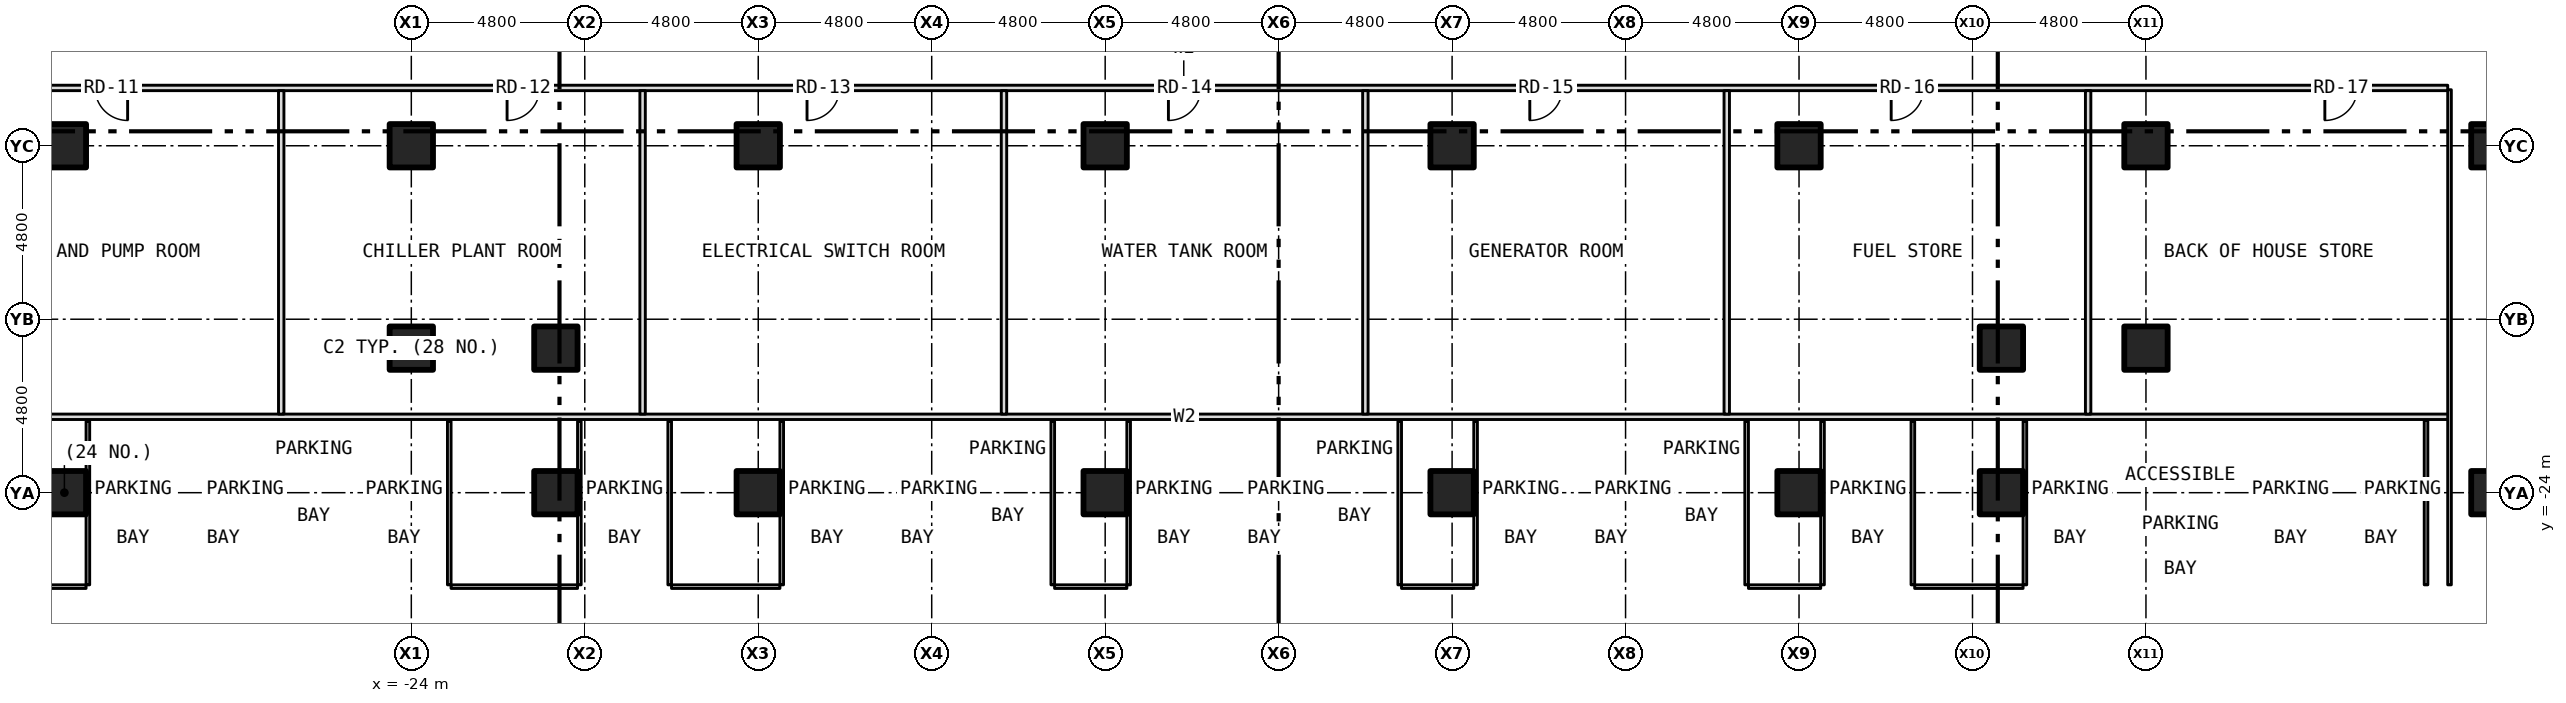
"""IFC4 building model, lengths in metres.
Left out: names, types, materials, properties, quantities, classifications, styles, units other than length and angle.
Written with IfcOpenShell. Run it as: python <this file> out.ifc"""

import sys

from ifc_helpers import new_model, si_unit, direction, frame, frame_2d, origin, origin_2d, place, context, subcontext, project, spatial, rectangle, hollow_rectangle, extrude, element, fill, save


model = new_model("IFC4")
c1 = context("Model", 3, precision=1e-05, world=origin(), true_north=direction((0.0, 1.0)))
c2 = subcontext(c1, "Body", "Model", "MODEL_VIEW")
j1 = project(units=[si_unit("LENGTHUNIT", "METRE"), si_unit("PLANEANGLEUNIT", "RADIAN")], contexts=[c1])
p1 = place(None, origin())
s1 = spatial("IfcSite", under=j1, at=p1, CompositionType="ELEMENT")
p2 = place(p1, origin())
s2 = spatial("IfcBuilding", under=s1, at=p2, CompositionType="ELEMENT")
p3 = place(p2, frame((0.0, 0.0, -10.0)))
s3 = spatial("IfcBuildingStorey", under=s2, at=p3, CompositionType="ELEMENT", Elevation=-10.0)
for number, where, z_axis, x_axis in (
    (1, (-33.6, -24.0, -0.6), (0.0, 0.0, 1.0), (1.0, 0.0, 0.0)),
    (2, (-33.6, -14.4, -0.6), (0.0, 0.0, 1.0), (1.0, 0.0, 0.0)),
    (3, (-20.0, -24.0, -0.6), (0.0, 0.0, 1.0), (1.0, 0.0, 0.0)),
    (4, (-14.4, -24.0, -0.6), (0.0, 0.0, 1.0), (1.0, 0.0, 0.0)),
    (5, (-4.8, -24.0, -0.6), (0.0, 0.0, 1.0), (1.0, 0.0, 0.0)),
    (6, (4.8, -24.0, -0.6), (0.0, 0.0, 1.0), (1.0, 0.0, 0.0)),
    (7, (14.4, -24.0, -0.6), (0.0, 0.0, 1.0), (1.0, 0.0, 0.0)),
    (8, (20.0, -24.0, -0.6), (0.0, 0.0, 1.0), (1.0, 0.0, 0.0)),
    (9, (33.6, -24.0, -0.6), (0.0, 0.0, 1.0), (1.0, 0.0, 0.0)),
    (10, (33.6, -14.4, -0.6), (0.0, 0.0, 1.0), (1.0, 0.0, 0.0)),
    (11, (-24.0, -20.0, -0.6), (0.0, 0.0, 1.0), (1.0, 0.0, 0.0)),
    (12, (-24.0, -14.4, -0.6), (0.0, 0.0, 1.0), (1.0, 0.0, 0.0)),
    (13, (-20.0, -20.0, -0.6), (0.0, 0.0, 1.0), (1.0, 0.0, 0.0)),
    (14, (-14.4, -14.4, -0.6), (0.0, 0.0, 1.0), (1.0, 0.0, 0.0)),
    (15, (-4.8, -14.4, -0.6), (0.0, 0.0, 1.0), (1.0, 0.0, 0.0)),
    (16, (4.8, -14.4, -0.6), (0.0, 0.0, 1.0), (1.0, 0.0, 0.0)),
    (17, (14.4, -14.4, -0.6), (0.0, 0.0, 1.0), (1.0, 0.0, 0.0)),
    (18, (20.0, -20.0, -0.6), (0.0, 0.0, 1.0), (1.0, 0.0, 0.0)),
    (19, (24.0, -20.0, -0.6), (0.0, 0.0, 1.0), (1.0, 0.0, 0.0)),
    (20, (24.0, -14.4, -0.6), (0.0, 0.0, 1.0), (1.0, 0.0, 0.0)),
):
    element("IfcColumn", number, at=place(p3, frame(where, z_axis=z_axis, x_axis=x_axis)), inside=s3, PredefinedType="COLUMN", context=c2, shape_type="SweptSolid", body=[
        extrude(hollow_rectangle(XDim=1.2, YDim=1.2, WallThickness=0.07, at=origin_2d()), origin(), (0.0, 0.0, 1.0), 5.3),
    ])
p4 = place(p3, frame((-35.05, -26.6, 0.0), z_axis=(0.0, 0.0, 1.0), x_axis=(1.0, 0.0, 0.0)))
e21 = element("IfcWall", 21, at=p4, inside=s3, PredefinedType="PARTITIONING", context=c2, shape_type="SweptSolid", body=[
    extrude(rectangle(XDim=2.05, YDim=0.1, at=frame_2d((1.025, 0.0))), origin(), (0.0, 0.0, 1.0), 4.7),
])
p5 = place(p3, frame((-22.9, -26.6, 0.0), z_axis=(0.0, 0.0, 1.0), x_axis=(1.0, 0.0, 0.0)))
e22 = element("IfcWall", 22, at=p5, inside=s3, PredefinedType="PARTITIONING", context=c2, shape_type="SweptSolid", body=[
    extrude(rectangle(XDim=3.5, YDim=0.1, at=frame_2d((1.75, 0.0))), origin(), (0.0, 0.0, 1.0), 4.7),
])
p6 = place(p3, frame((-16.8, -26.6, 0.0), z_axis=(0.0, 0.0, 1.0), x_axis=(1.0, 0.0, 0.0)))
e23 = element("IfcWall", 23, at=p6, inside=s3, PredefinedType="PARTITIONING", context=c2, shape_type="SweptSolid", body=[
    extrude(rectangle(XDim=3.0, YDim=0.1, at=frame_2d((1.5, 0.0))), origin(), (0.0, 0.0, 1.0), 4.7),
])
for number, where, z_axis, x_axis in (
    (24, (-6.2, -26.6, 0.0), (0.0, 0.0, 1.0), (1.0, 0.0, 0.0)),
    (25, (3.4, -26.6, 0.0), (0.0, 0.0, 1.0), (1.0, 0.0, 0.0)),
    (26, (13.0, -26.6, 0.0), (0.0, 0.0, 1.0), (1.0, 0.0, 0.0)),
):
    element("IfcWall", number, at=place(p3, frame(where, z_axis=z_axis, x_axis=x_axis)), inside=s3, PredefinedType="PARTITIONING", context=c2, shape_type="SweptSolid", body=[
        extrude(rectangle(XDim=2.0, YDim=0.1, at=frame_2d((1.0, 0.0))), origin(), (0.0, 0.0, 1.0), 4.7),
    ])
p7 = place(p3, frame((17.6, -26.6, 0.0), z_axis=(0.0, 0.0, 1.0), x_axis=(1.0, 0.0, 0.0)))
e27 = element("IfcWall", 27, at=p7, inside=s3, PredefinedType="PARTITIONING", context=c2, shape_type="SweptSolid", body=[
    extrude(rectangle(XDim=3.0, YDim=0.1, at=frame_2d((1.5, 0.0))), origin(), (0.0, 0.0, 1.0), 4.7),
])
p8 = place(p3, frame((-37.6, -21.9, 0.0), z_axis=(0.0, 0.0, 1.0), x_axis=(1.0, 0.0, 0.0)))
e28 = element("IfcWall", 28, at=p8, inside=s3, PredefinedType="PARTITIONING", context=c2, shape_type="SweptSolid", body=[
    extrude(rectangle(XDim=70.0, YDim=0.15, at=frame_2d((35.0, 0.0))), origin(), (0.0, 0.0, 1.0), 4.7),
])
p9 = place(p3, frame((-37.6, -12.8, 0.0), z_axis=(0.0, 0.0, 1.0), x_axis=(1.0, 0.0, 0.0)))
e29 = element("IfcWall", 29, at=p9, inside=s3, PredefinedType="PARTITIONING", context=c2, shape_type="SweptSolid", body=[
    extrude(rectangle(XDim=69.95, YDim=0.15, at=frame_2d((34.975, 0.0))), origin(), (0.0, 0.0, 1.0), 4.7),
])
p10 = place(p9, frame((4.85, 0.0, 0.0)))
e30 = element("IfcOpeningElement", 30, at=p10, cuts=e29, PredefinedType="OPENING", context=c2, shape_type="SweptSolid", body=[
    extrude(rectangle(XDim=0.9, YDim=2.1, at=frame_2d((0.45, 1.05))), frame((0.0, 0.087, 0.0), z_axis=(0.0, -1.0, 0.0), x_axis=(1.0, 0.0, 0.0)), (0.0, 0.0, 1.0), 0.174),
])
p11 = place(p9, frame((16.25, 0.0, 0.0)))
e31 = element("IfcOpeningElement", 31, at=p11, cuts=e29, PredefinedType="OPENING", context=c2, shape_type="SweptSolid", body=[
    extrude(rectangle(XDim=0.9, YDim=2.1, at=frame_2d((0.45, 1.05))), frame((0.0, 0.087, 0.0), z_axis=(0.0, -1.0, 0.0), x_axis=(1.0, 0.0, 0.0)), (0.0, 0.0, 1.0), 0.174),
])
p12 = place(p9, frame((24.55, 0.0, 0.0)))
e32 = element("IfcOpeningElement", 32, at=p12, cuts=e29, PredefinedType="OPENING", context=c2, shape_type="SweptSolid", body=[
    extrude(rectangle(XDim=0.9, YDim=2.1, at=frame_2d((0.45, 1.05))), frame((0.0, 0.087, 0.0), z_axis=(0.0, -1.0, 0.0), x_axis=(1.0, 0.0, 0.0)), (0.0, 0.0, 1.0), 0.174),
])
p13 = place(p9, frame((34.55, 0.0, 0.0)))
e33 = element("IfcOpeningElement", 33, at=p13, cuts=e29, PredefinedType="OPENING", context=c2, shape_type="SweptSolid", body=[
    extrude(rectangle(XDim=0.9, YDim=2.1, at=frame_2d((0.45, 1.05))), frame((0.0, 0.087, 0.0), z_axis=(0.0, -1.0, 0.0), x_axis=(1.0, 0.0, 0.0)), (0.0, 0.0, 1.0), 0.174),
])
p14 = place(p9, frame((44.55, 0.0, 0.0)))
e34 = element("IfcOpeningElement", 34, at=p14, cuts=e29, PredefinedType="OPENING", context=c2, shape_type="SweptSolid", body=[
    extrude(rectangle(XDim=0.9, YDim=2.1, at=frame_2d((0.45, 1.05))), frame((0.0, 0.087, 0.0), z_axis=(0.0, -1.0, 0.0), x_axis=(1.0, 0.0, 0.0)), (0.0, 0.0, 1.0), 0.174),
])
p15 = place(p9, frame((54.55, 0.0, 0.0)))
e35 = element("IfcOpeningElement", 35, at=p15, cuts=e29, PredefinedType="OPENING", context=c2, shape_type="SweptSolid", body=[
    extrude(rectangle(XDim=0.9, YDim=2.1, at=frame_2d((0.45, 1.05))), frame((0.0, 0.087, 0.0), z_axis=(0.0, -1.0, 0.0), x_axis=(1.0, 0.0, 0.0)), (0.0, 0.0, 1.0), 0.174),
])
p16 = place(p9, frame((66.55, 0.0, 0.0)))
e36 = element("IfcOpeningElement", 36, at=p16, cuts=e29, PredefinedType="OPENING", context=c2, shape_type="SweptSolid", body=[
    extrude(rectangle(XDim=0.9, YDim=2.1, at=frame_2d((0.45, 1.05))), frame((0.0, 0.087, 0.0), z_axis=(0.0, -1.0, 0.0), x_axis=(1.0, 0.0, 0.0)), (0.0, 0.0, 1.0), 0.174),
])
p17 = place(p3, frame((-32.95, -26.55, 0.0), z_axis=(0.0, 0.0, 1.0), x_axis=(0.0, 1.0, 0.0)))
e37 = element("IfcWall", 37, at=p17, inside=s3, PredefinedType="PARTITIONING", context=c2, shape_type="SweptSolid", body=[
    extrude(rectangle(XDim=4.525, YDim=0.1, at=frame_2d((2.263, 0.0))), origin(), (0.0, 0.0, 1.0), 4.7),
])
p18 = place(p3, frame((-27.6, -21.825, 0.0), z_axis=(0.0, 0.0, 1.0), x_axis=(0.0, 1.0, 0.0)))
e38 = element("IfcWall", 38, at=p18, inside=s3, PredefinedType="PARTITIONING", context=c2, shape_type="SweptSolid", body=[
    extrude(rectangle(XDim=8.95, YDim=0.15, at=frame_2d((4.475, 0.0))), origin(), (0.0, 0.0, 1.0), 4.7),
])
p19 = place(p3, frame((-22.95, -26.55, 0.0), z_axis=(0.0, 0.0, 1.0), x_axis=(0.0, 1.0, 0.0)))
e39 = element("IfcWall", 39, at=p19, inside=s3, PredefinedType="PARTITIONING", context=c2, shape_type="SweptSolid", body=[
    extrude(rectangle(XDim=4.525, YDim=0.1, at=frame_2d((2.263, 0.0))), origin(), (0.0, 0.0, 1.0), 4.7),
])
p20 = place(p3, frame((-19.35, -26.55, 0.0), z_axis=(0.0, 0.0, 1.0), x_axis=(0.0, 1.0, 0.0)))
e40 = element("IfcWall", 40, at=p20, inside=s3, PredefinedType="PARTITIONING", context=c2, shape_type="SweptSolid", body=[
    extrude(rectangle(XDim=2.396, YDim=0.1, at=frame_2d((1.198, 0.0))), origin(), (0.0, 0.0, 1.0), 4.083),
])
p21 = place(p3, frame((-19.35, -24.154, 0.0), z_axis=(0.0, 0.0, 1.0), x_axis=(0.0, 1.0, 0.0)))
e41 = element("IfcWall", 41, at=p21, inside=s3, PredefinedType="PARTITIONING", context=c2, shape_type="SweptSolid", body=[
    extrude(rectangle(XDim=0.308, YDim=0.1, at=frame_2d((0.154, 0.0))), origin(), (0.0, 0.0, 1.0), 4.7),
])
p22 = place(p3, frame((-19.35, -23.846, 0.0), z_axis=(0.0, 0.0, 1.0), x_axis=(0.0, 1.0, 0.0)))
e42 = element("IfcWall", 42, at=p22, inside=s3, PredefinedType="PARTITIONING", context=c2, shape_type="SweptSolid", body=[
    extrude(rectangle(XDim=1.821, YDim=0.1, at=frame_2d((0.911, 0.0))), origin(), (0.0, 0.0, 1.0), 4.083),
])
p23 = place(p3, frame((-17.6, -21.825, 0.0), z_axis=(0.0, 0.0, 1.0), x_axis=(0.0, 1.0, 0.0)))
e43 = element("IfcWall", 43, at=p23, inside=s3, PredefinedType="PARTITIONING", context=c2, shape_type="SweptSolid", body=[
    extrude(rectangle(XDim=8.95, YDim=0.15, at=frame_2d((4.475, 0.0))), origin(), (0.0, 0.0, 1.0), 4.7),
])
for number, where, z_axis, x_axis in (
    (44, (-16.85, -26.55, 0.0), (0.0, 0.0, 1.0), (0.0, 1.0, 0.0)),
    (45, (-13.75, -26.55, 0.0), (0.0, 0.0, 1.0), (0.0, 1.0, 0.0)),
):
    element("IfcWall", number, at=place(p3, frame(where, z_axis=z_axis, x_axis=x_axis)), inside=s3, PredefinedType="PARTITIONING", context=c2, shape_type="SweptSolid", body=[
        extrude(rectangle(XDim=4.525, YDim=0.1, at=frame_2d((2.263, 0.0))), origin(), (0.0, 0.0, 1.0), 4.7),
    ])
p24 = place(p3, frame((-7.6, -21.825, 0.0), z_axis=(0.0, 0.0, 1.0), x_axis=(0.0, 1.0, 0.0)))
e46 = element("IfcWall", 46, at=p24, inside=s3, PredefinedType="PARTITIONING", context=c2, shape_type="SweptSolid", body=[
    extrude(rectangle(XDim=8.95, YDim=0.15, at=frame_2d((4.475, 0.0))), origin(), (0.0, 0.0, 1.0), 4.7),
])
for number, where, z_axis, x_axis in (
    (47, (-6.25, -26.55, 0.0), (0.0, 0.0, 1.0), (0.0, 1.0, 0.0)),
    (48, (-4.15, -26.55, 0.0), (0.0, 0.0, 1.0), (0.0, 1.0, 0.0)),
):
    element("IfcWall", number, at=place(p3, frame(where, z_axis=z_axis, x_axis=x_axis)), inside=s3, PredefinedType="PARTITIONING", context=c2, shape_type="SweptSolid", body=[
        extrude(rectangle(XDim=4.525, YDim=0.1, at=frame_2d((2.263, 0.0))), origin(), (0.0, 0.0, 1.0), 4.7),
    ])
p25 = place(p3, frame((2.4, -21.825, 0.0), z_axis=(0.0, 0.0, 1.0), x_axis=(0.0, 1.0, 0.0)))
e49 = element("IfcWall", 49, at=p25, inside=s3, PredefinedType="PARTITIONING", context=c2, shape_type="SweptSolid", body=[
    extrude(rectangle(XDim=8.95, YDim=0.15, at=frame_2d((4.475, 0.0))), origin(), (0.0, 0.0, 1.0), 4.7),
])
for number, where, z_axis, x_axis in (
    (50, (3.35, -26.55, 0.0), (0.0, 0.0, 1.0), (0.0, 1.0, 0.0)),
    (51, (5.45, -26.55, 0.0), (0.0, 0.0, 1.0), (0.0, 1.0, 0.0)),
):
    element("IfcWall", number, at=place(p3, frame(where, z_axis=z_axis, x_axis=x_axis)), inside=s3, PredefinedType="PARTITIONING", context=c2, shape_type="SweptSolid", body=[
        extrude(rectangle(XDim=4.525, YDim=0.1, at=frame_2d((2.263, 0.0))), origin(), (0.0, 0.0, 1.0), 4.7),
    ])
p26 = place(p3, frame((12.4, -21.825, 0.0), z_axis=(0.0, 0.0, 1.0), x_axis=(0.0, 1.0, 0.0)))
e52 = element("IfcWall", 52, at=p26, inside=s3, PredefinedType="PARTITIONING", context=c2, shape_type="SweptSolid", body=[
    extrude(rectangle(XDim=8.95, YDim=0.15, at=frame_2d((4.475, 0.0))), origin(), (0.0, 0.0, 1.0), 4.7),
])
for number, where, z_axis, x_axis in (
    (53, (12.95, -26.55, 0.0), (0.0, 0.0, 1.0), (0.0, 1.0, 0.0)),
    (54, (15.05, -26.55, 0.0), (0.0, 0.0, 1.0), (0.0, 1.0, 0.0)),
    (55, (17.55, -26.55, 0.0), (0.0, 0.0, 1.0), (0.0, 1.0, 0.0)),
    (56, (20.65, -26.55, 0.0), (0.0, 0.0, 1.0), (0.0, 1.0, 0.0)),
):
    element("IfcWall", number, at=place(p3, frame(where, z_axis=z_axis, x_axis=x_axis)), inside=s3, PredefinedType="PARTITIONING", context=c2, shape_type="SweptSolid", body=[
        extrude(rectangle(XDim=4.525, YDim=0.1, at=frame_2d((2.263, 0.0))), origin(), (0.0, 0.0, 1.0), 4.7),
    ])
p27 = place(p3, frame((22.4, -21.825, 0.0), z_axis=(0.0, 0.0, 1.0), x_axis=(0.0, 1.0, 0.0)))
e57 = element("IfcWall", 57, at=p27, inside=s3, PredefinedType="PARTITIONING", context=c2, shape_type="SweptSolid", body=[
    extrude(rectangle(XDim=8.95, YDim=0.15, at=frame_2d((4.475, 0.0))), origin(), (0.0, 0.0, 1.0), 4.7),
])
p28 = place(p3, frame((31.75, -26.55, 0.0), z_axis=(0.0, 0.0, 1.0), x_axis=(0.0, 1.0, 0.0)))
e58 = element("IfcWall", 58, at=p28, inside=s3, PredefinedType="PARTITIONING", context=c2, shape_type="SweptSolid", body=[
    extrude(rectangle(XDim=4.55, YDim=0.1, at=frame_2d((2.275, 0.0))), origin(), (0.0, 0.0, 1.0), 4.7),
])
p29 = place(p3, frame((32.4, -26.55, 0.0), z_axis=(0.0, 0.0, 1.0), x_axis=(0.0, 1.0, 0.0)))
e59 = element("IfcWall", 59, at=p29, inside=s3, PredefinedType="PARTITIONING", context=c2, shape_type="SweptSolid", body=[
    extrude(rectangle(XDim=13.7, YDim=0.1, at=frame_2d((6.85, 0.0))), origin(), (0.0, 0.0, 1.0), 4.7),
])
p30 = place(p10, origin())
e60 = element("IfcDoor", 60, at=p30, inside=s3, OperationType="SINGLE_SWING_RIGHT", PredefinedType="DOOR", context=c2, shape_type="SweptSolid", body=[
    extrude(rectangle(XDim=0.9, YDim=2.1, at=frame_2d((0.45, 1.05))), frame((0.0, 0.025, 0.0), z_axis=(0.0, -1.0, 0.0), x_axis=(1.0, 0.0, 0.0)), (0.0, 0.0, 1.0), 0.05),
])
fill(e30, e60)
p31 = place(p11, origin())
e61 = element("IfcDoor", 61, at=p31, inside=s3, OperationType="SINGLE_SWING_LEFT", PredefinedType="DOOR", context=c2, shape_type="SweptSolid", body=[
    extrude(rectangle(XDim=0.9, YDim=2.1, at=frame_2d((0.45, 1.05))), frame((0.0, 0.025, 0.0), z_axis=(0.0, -1.0, 0.0), x_axis=(1.0, 0.0, 0.0)), (0.0, 0.0, 1.0), 0.05),
])
fill(e31, e61)
p32 = place(p12, origin())
e62 = element("IfcDoor", 62, at=p32, inside=s3, OperationType="SINGLE_SWING_LEFT", PredefinedType="DOOR", context=c2, shape_type="SweptSolid", body=[
    extrude(rectangle(XDim=0.9, YDim=2.1, at=frame_2d((0.45, 1.05))), frame((0.0, 0.025, 0.0), z_axis=(0.0, -1.0, 0.0), x_axis=(1.0, 0.0, 0.0)), (0.0, 0.0, 1.0), 0.05),
])
fill(e32, e62)
p33 = place(p13, origin())
e63 = element("IfcDoor", 63, at=p33, inside=s3, OperationType="SINGLE_SWING_LEFT", PredefinedType="DOOR", context=c2, shape_type="SweptSolid", body=[
    extrude(rectangle(XDim=0.9, YDim=2.1, at=frame_2d((0.45, 1.05))), frame((0.0, 0.025, 0.0), z_axis=(0.0, -1.0, 0.0), x_axis=(1.0, 0.0, 0.0)), (0.0, 0.0, 1.0), 0.05),
])
fill(e33, e63)
p34 = place(p14, origin())
e64 = element("IfcDoor", 64, at=p34, inside=s3, OperationType="SINGLE_SWING_LEFT", PredefinedType="DOOR", context=c2, shape_type="SweptSolid", body=[
    extrude(rectangle(XDim=0.9, YDim=2.1, at=frame_2d((0.45, 1.05))), frame((0.0, 0.025, 0.0), z_axis=(0.0, -1.0, 0.0), x_axis=(1.0, 0.0, 0.0)), (0.0, 0.0, 1.0), 0.05),
])
fill(e34, e64)
p35 = place(p15, origin())
e65 = element("IfcDoor", 65, at=p35, inside=s3, OperationType="SINGLE_SWING_LEFT", PredefinedType="DOOR", context=c2, shape_type="SweptSolid", body=[
    extrude(rectangle(XDim=0.9, YDim=2.1, at=frame_2d((0.45, 1.05))), frame((0.0, 0.025, 0.0), z_axis=(0.0, -1.0, 0.0), x_axis=(1.0, 0.0, 0.0)), (0.0, 0.0, 1.0), 0.05),
])
fill(e35, e65)
p36 = place(p16, origin())
e66 = element("IfcDoor", 66, at=p36, inside=s3, OperationType="SINGLE_SWING_LEFT", PredefinedType="DOOR", context=c2, shape_type="SweptSolid", body=[
    extrude(rectangle(XDim=0.9, YDim=2.1, at=frame_2d((0.45, 1.05))), frame((0.0, 0.025, 0.0), z_axis=(0.0, -1.0, 0.0), x_axis=(1.0, 0.0, 0.0)), (0.0, 0.0, 1.0), 0.05),
])
fill(e36, e66)
save(model, sys.argv[1])
